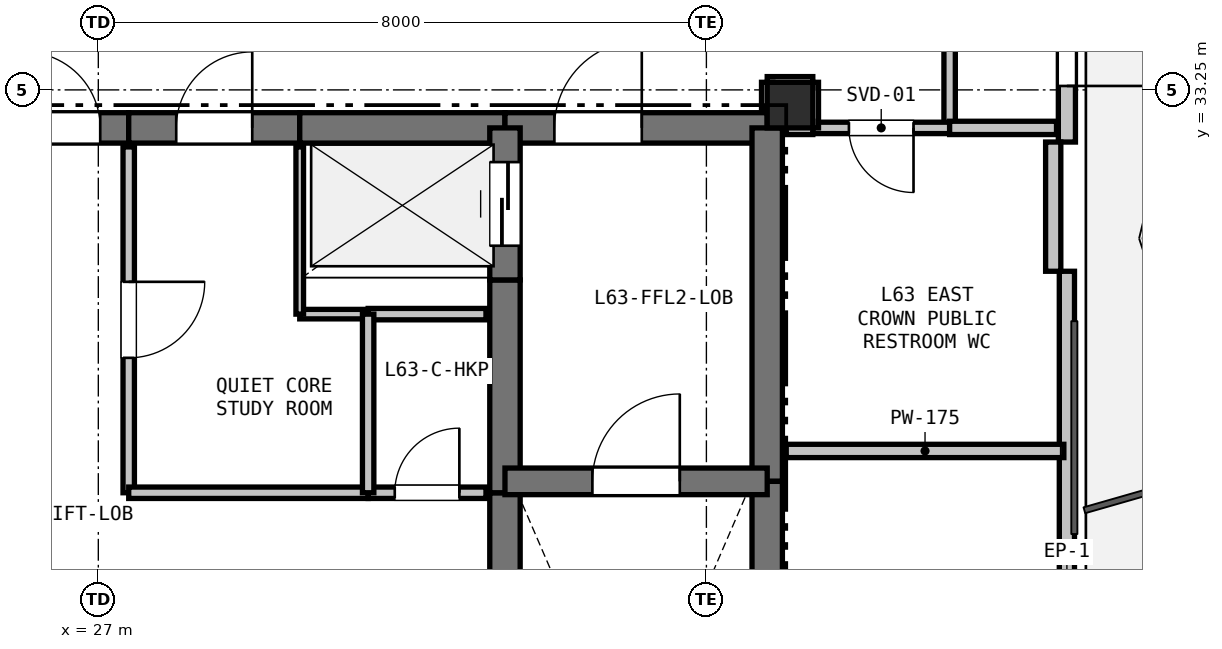
"""IFC4 building model, lengths in metres.
Left out: names, types, materials, properties, quantities, classifications, styles, units other than length and angle.
Written with IfcOpenShell. Run it as: python <this file> out.ifc"""

import sys

from ifc_helpers import new_model, si_unit, direction, frame, frame_2d, origin, origin_2d, place, context, subcontext, project, spatial, rectangle, extrude, element, fill, save


model = new_model("IFC4")
c1 = context("Model", 3, precision=1e-05, world=origin(), true_north=direction((0.0, 1.0)))
c2 = subcontext(c1, "Body", "Model", "MODEL_VIEW")
j1 = project(units=[si_unit("LENGTHUNIT", "METRE"), si_unit("PLANEANGLEUNIT", "RADIAN")], contexts=[c1])
p1 = place(None, origin())
s1 = spatial("IfcSite", under=j1, at=p1, CompositionType="ELEMENT")
p2 = place(p1, origin())
s2 = spatial("IfcBuilding", under=s1, at=p2, CompositionType="ELEMENT")
p3 = place(p2, frame((0.0, 0.0, 226.5)))
s3 = spatial("IfcBuildingStorey", under=s2, at=p3, CompositionType="ELEMENT", Elevation=226.5)
p4 = place(p3, frame((36.1, 33.05, 0.0), z_axis=(0.0, 0.0, 1.0), x_axis=(1.0, 0.0, 0.0)))
e1 = element("IfcColumn", 1, at=p4, inside=s3, PredefinedType="COLUMN", context=c2, shape_type="SweptSolid", body=[
    extrude(rectangle(XDim=0.6, YDim=0.6, at=origin_2d()), origin(), (0.0, 0.0, 1.0), 3.3),
])
p5 = place(p3, frame((39.743, 41.492, 0.0), z_axis=(0.0, 0.0, 1.0), x_axis=(0.0, -1.0, 0.0)))
e2 = element("IfcWall", 2, at=p5, inside=s3, PredefinedType="SOLIDWALL", context=c2, shape_type="SweptSolid", body=[
    extrude(rectangle(XDim=8.928, YDim=0.225, at=frame_2d((4.464, 0.0))), origin(), (0.0, 0.0, 1.0), 2.7),
])
p6 = place(p5, frame((7.09, 0.0, 0.0)))
e3 = element("IfcOpeningElement", 3, at=p6, cuts=e2, PredefinedType="OPENING", context=c2, shape_type="SweptSolid", body=[
    extrude(rectangle(XDim=1.1, YDim=2.1, at=frame_2d((0.55, 1.05))), frame((0.0, 0.123, 0.0), z_axis=(0.0, -1.0, 0.0), x_axis=(1.0, 0.0, 0.0)), (0.0, 0.0, 1.0), 0.245),
])
p7 = place(p5, frame((1.406, 0.0, 0.9)))
e4 = element("IfcOpeningElement", 4, at=p7, cuts=e2, PredefinedType="OPENING", context=c2, shape_type="SweptSolid", body=[
    extrude(rectangle(XDim=1.2, YDim=1.4, at=frame_2d((0.6, 0.7))), frame((0.0, 0.123, 0.0), z_axis=(0.0, -1.0, 0.0), x_axis=(1.0, 0.0, 0.0)), (0.0, 0.0, 1.0), 0.245),
])
p8 = place(p3, frame((39.743, 30.864, 0.0), z_axis=(0.0, 0.0, 1.0), x_axis=(0.0, -1.0, 0.0)))
e5 = element("IfcWall", 5, at=p8, inside=s3, PredefinedType="PARAPET", context=c2, shape_type="SweptSolid", body=[
    extrude(rectangle(XDim=8.228, YDim=0.2, at=frame_2d((4.114, 0.0))), origin(), (0.0, 0.0, 1.0), 0.2),
])
p9 = place(p3, frame((39.563, 32.564, 0.0), z_axis=(0.0, 0.0, 1.0), x_axis=(0.0, -1.0, 0.0)))
e6 = element("IfcWall", 6, at=p9, inside=s3, PredefinedType="PARAPET", context=c2, shape_type="SweptSolid", body=[
    extrude(rectangle(XDim=1.7, YDim=0.2, at=frame_2d((0.85, 0.0))), origin(), (0.0, 0.0, 1.0), 2.7),
])
p10 = place(p3, frame((25.65, 32.75, 0.0), z_axis=(0.0, 0.0, 1.0), x_axis=(1.0, 0.0, 0.0)))
e7 = element("IfcWall", 7, at=p10, inside=s3, PredefinedType="SHEAR", context=c2, shape_type="SweptSolid", body=[
    extrude(rectangle(XDim=1.75, YDim=0.4, at=frame_2d((0.875, 0.0))), origin(), (0.0, 0.0, 1.0), 3.08),
])
p11 = place(p10, frame((0.375, 0.0, 0.0)))
e8 = element("IfcOpeningElement", 8, at=p11, cuts=e7, PredefinedType="OPENING", context=c2, shape_type="SweptSolid", body=[
    extrude(rectangle(XDim=1.0, YDim=2.15, at=frame_2d((0.5, 1.075))), frame((0.0, 0.21, 0.0), z_axis=(0.0, -1.0, 0.0), x_axis=(1.0, 0.0, 0.0)), (0.0, 0.0, 1.0), 0.42),
])
p12 = place(p3, frame((27.4, 32.75, 0.0), z_axis=(0.0, 0.0, 1.0), x_axis=(1.0, 0.0, 0.0)))
e9 = element("IfcWall", 9, at=p12, inside=s3, PredefinedType="SHEAR", context=c2, shape_type="SweptSolid", body=[
    extrude(rectangle(XDim=2.25, YDim=0.4, at=frame_2d((1.125, 0.0))), origin(), (0.0, 0.0, 1.0), 3.08),
])
p13 = place(p12, frame((0.625, 0.0, 0.0)))
e10 = element("IfcOpeningElement", 10, at=p13, cuts=e9, PredefinedType="OPENING", context=c2, shape_type="SweptSolid", body=[
    extrude(rectangle(XDim=1.0, YDim=2.15, at=frame_2d((0.5, 1.075))), frame((0.0, 0.21, 0.0), z_axis=(0.0, -1.0, 0.0), x_axis=(1.0, 0.0, 0.0)), (0.0, 0.0, 1.0), 0.42),
])
p14 = place(p3, frame((29.65, 32.75, 0.0), z_axis=(0.0, 0.0, 1.0), x_axis=(1.0, 0.0, 0.0)))
e11 = element("IfcWall", 11, at=p14, inside=s3, PredefinedType="SHEAR", context=c2, shape_type="SweptSolid", body=[
    extrude(rectangle(XDim=2.7, YDim=0.4, at=frame_2d((1.35, 0.0))), origin(), (0.0, 0.0, 1.0), 3.08),
])
p15 = place(p3, frame((32.35, 32.75, 0.0), z_axis=(0.0, 0.0, 1.0), x_axis=(1.0, 0.0, 0.0)))
e12 = element("IfcWall", 12, at=p15, inside=s3, PredefinedType="SHEAR", context=c2, shape_type="SweptSolid", body=[
    extrude(rectangle(XDim=3.45, YDim=0.4, at=frame_2d((1.725, 0.0))), origin(), (0.0, 0.0, 1.0), 3.08),
])
p16 = place(p15, frame((0.65, 0.0, 0.0)))
e13 = element("IfcOpeningElement", 13, at=p16, cuts=e12, PredefinedType="OPENING", context=c2, shape_type="SweptSolid", body=[
    extrude(rectangle(XDim=1.15, YDim=2.15, at=frame_2d((0.575, 1.075))), frame((0.0, 0.21, 0.0), z_axis=(0.0, -1.0, 0.0), x_axis=(1.0, 0.0, 0.0)), (0.0, 0.0, 1.0), 0.42),
])
p17 = place(p3, frame((35.8, 32.75, 0.0), z_axis=(0.0, 0.0, 1.0), x_axis=(0.0, -1.0, 0.0)))
e14 = element("IfcWall", 14, at=p17, inside=s3, PredefinedType="SHEAR", context=c2, shape_type="SweptSolid", body=[
    extrude(rectangle(XDim=4.65, YDim=0.4, at=frame_2d((2.325, 0.0))), origin(), (0.0, 0.0, 1.0), 3.08),
])
p18 = place(p3, frame((35.8, 28.1, 0.0), z_axis=(0.0, 0.0, 1.0), x_axis=(0.0, -1.0, 0.0)))
e15 = element("IfcWall", 15, at=p18, inside=s3, PredefinedType="SHEAR", context=c2, shape_type="SweptSolid", body=[
    extrude(rectangle(XDim=7.35, YDim=0.4, at=frame_2d((3.675, 0.0))), origin(), (0.0, 0.0, 1.0), 3.08),
])
p19 = place(p3, frame((32.35, 25.55, 0.0), z_axis=(0.0, 0.0, 1.0), x_axis=(0.0, 1.0, 0.0)))
e16 = element("IfcWall", 16, at=p19, inside=s3, PredefinedType="SHEAR", context=c2, shape_type="SweptSolid", body=[
    extrude(rectangle(XDim=2.4, YDim=0.4, at=frame_2d((1.2, 0.0))), origin(), (0.0, 0.0, 1.0), 3.08),
])
p20 = place(p3, frame((32.35, 27.95, 0.0), z_axis=(0.0, 0.0, 1.0), x_axis=(0.0, 1.0, 0.0)))
e17 = element("IfcWall", 17, at=p20, inside=s3, PredefinedType="SHEAR", context=c2, shape_type="SweptSolid", body=[
    extrude(rectangle(XDim=2.8, YDim=0.4, at=frame_2d((1.4, 0.0))), origin(), (0.0, 0.0, 1.0), 3.08),
])
p21 = place(p3, frame((32.35, 30.75, 0.0), z_axis=(0.0, 0.0, 1.0), x_axis=(0.0, 1.0, 0.0)))
e18 = element("IfcWall", 18, at=p21, inside=s3, PredefinedType="SHEAR", context=c2, shape_type="SweptSolid", body=[
    extrude(rectangle(XDim=2.0, YDim=0.4, at=frame_2d((1.0, 0.0))), origin(), (0.0, 0.0, 1.0), 3.08),
])
p22 = place(p21, frame((0.45, 0.0, 0.0)))
e19 = element("IfcOpeningElement", 19, at=p22, cuts=e18, PredefinedType="OPENING", context=c2, shape_type="SweptSolid", body=[
    extrude(rectangle(XDim=1.1, YDim=2.15, at=frame_2d((0.55, 1.075))), frame((0.0, 0.21, 0.0), z_axis=(0.0, -1.0, 0.0), x_axis=(1.0, 0.0, 0.0)), (0.0, 0.0, 1.0), 0.42),
])
p23 = place(p3, frame((32.35, 28.1, 0.0), z_axis=(0.0, 0.0, 1.0), x_axis=(1.0, 0.0, 0.0)))
e20 = element("IfcWall", 20, at=p23, inside=s3, PredefinedType="SHEAR", context=c2, shape_type="SweptSolid", body=[
    extrude(rectangle(XDim=3.45, YDim=0.35, at=frame_2d((1.725, 0.0))), origin(), (0.0, 0.0, 1.0), 3.08),
])
p24 = place(p23, frame((1.15, 0.0, 0.0)))
e21 = element("IfcOpeningElement", 21, at=p24, cuts=e20, PredefinedType="OPENING", context=c2, shape_type="SweptSolid", body=[
    extrude(rectangle(XDim=1.15, YDim=2.15, at=frame_2d((0.575, 1.075))), frame((0.0, 0.185, 0.0), z_axis=(0.0, -1.0, 0.0), x_axis=(1.0, 0.0, 0.0)), (0.0, 0.0, 1.0), 0.37),
])
p25 = place(p3, frame((32.1, 30.3, 0.0), z_axis=(0.0, 0.0, 1.0), x_axis=(-1.0, 0.0, 0.0)))
e22 = element("IfcWall", 22, at=p25, inside=s3, PredefinedType="PARTITIONING", context=c2, shape_type="SweptSolid", body=[
    extrude(rectangle(XDim=1.55, YDim=0.15, at=frame_2d((0.775, 0.0))), origin(), (0.0, 0.0, 1.0), 3.08),
])
p26 = place(p3, frame((30.55, 30.3, 0.0), z_axis=(0.0, 0.0, 1.0), x_axis=(-1.0, 0.0, 0.0)))
e23 = element("IfcWall", 23, at=p26, inside=s3, PredefinedType="PARTITIONING", context=c2, shape_type="SweptSolid", body=[
    extrude(rectangle(XDim=0.9, YDim=0.125, at=frame_2d((0.45, 0.0))), origin(), (0.0, 0.0, 1.0), 3.08),
])
p27 = place(p3, frame((29.65, 30.3, 0.0), z_axis=(0.0, 0.0, 1.0), x_axis=(0.0, 1.0, 0.0)))
e24 = element("IfcWall", 24, at=p27, inside=s3, PredefinedType="PARTITIONING", context=c2, shape_type="SweptSolid", body=[
    extrude(rectangle(XDim=2.2, YDim=0.1, at=frame_2d((1.1, 0.0))), origin(), (0.0, 0.0, 1.0), 3.08),
])
p28 = place(p3, frame((27.4, 32.5, 0.0), z_axis=(0.0, 0.0, 1.0), x_axis=(0.0, -1.0, 0.0)))
e25 = element("IfcWall", 25, at=p28, inside=s3, PredefinedType="PARTITIONING", context=c2, shape_type="SweptSolid", body=[
    extrude(rectangle(XDim=4.55, YDim=0.15, at=frame_2d((2.275, 0.0))), origin(), (0.0, 0.0, 1.0), 3.08),
])
p29 = place(p28, frame((1.775, 0.0, 0.0)))
e26 = element("IfcOpeningElement", 26, at=p29, cuts=e25, PredefinedType="OPENING", context=c2, shape_type="SweptSolid", body=[
    extrude(rectangle(XDim=1.0, YDim=2.15, at=frame_2d((0.5, 1.075))), frame((0.0, 0.085, 0.0), z_axis=(0.0, -1.0, 0.0), x_axis=(1.0, 0.0, 0.0)), (0.0, 0.0, 1.0), 0.17),
])
p30 = place(p3, frame((27.4, 27.95, 0.0), z_axis=(0.0, 0.0, 1.0), x_axis=(1.0, 0.0, 0.0)))
e27 = element("IfcWall", 27, at=p30, inside=s3, PredefinedType="PARTITIONING", context=c2, shape_type="SweptSolid", body=[
    extrude(rectangle(XDim=3.15, YDim=0.15, at=frame_2d((1.575, 0.0))), origin(), (0.0, 0.0, 1.0), 3.08),
])
p31 = place(p3, frame((30.55, 27.95, 0.0), z_axis=(0.0, 0.0, 1.0), x_axis=(1.0, 0.0, 0.0)))
e28 = element("IfcWall", 28, at=p31, inside=s3, PredefinedType="PARTITIONING", context=c2, shape_type="SweptSolid", body=[
    extrude(rectangle(XDim=1.55, YDim=0.15, at=frame_2d((0.775, 0.0))), origin(), (0.0, 0.0, 1.0), 3.08),
])
p32 = place(p31, frame((0.35, 0.0, 0.0)))
e29 = element("IfcOpeningElement", 29, at=p32, cuts=e28, PredefinedType="OPENING", context=c2, shape_type="SweptSolid", body=[
    extrude(rectangle(XDim=0.85, YDim=2.1, at=frame_2d((0.425, 1.05))), frame((0.0, 0.085, 0.0), z_axis=(0.0, -1.0, 0.0), x_axis=(1.0, 0.0, 0.0)), (0.0, 0.0, 1.0), 0.17),
])
p33 = place(p3, frame((38.2, 35.2, 0.0), z_axis=(0.0, 0.0, 1.0), x_axis=(0.0, -1.0, 0.0)))
e30 = element("IfcWall", 30, at=p33, inside=s3, PredefinedType="PARTITIONING", context=c2, shape_type="SweptSolid", body=[
    extrude(rectangle(XDim=2.45, YDim=0.15, at=frame_2d((1.225, 0.0))), origin(), (0.0, 0.0, 1.0), 3.08),
])
p34 = place(p3, frame((38.2, 32.75, 0.0), z_axis=(0.0, 0.0, 1.0), x_axis=(-1.0, 0.0, 0.0)))
e31 = element("IfcWall", 31, at=p34, inside=s3, PredefinedType="PARTITIONING", context=c2, shape_type="SweptSolid", body=[
    extrude(rectangle(XDim=1.8, YDim=0.15, at=frame_2d((0.9, 0.0))), origin(), (0.0, 0.0, 1.0), 3.08),
])
p35 = place(p34, frame((0.475, 0.0, 0.0)))
e32 = element("IfcOpeningElement", 32, at=p35, cuts=e31, PredefinedType="OPENING", context=c2, shape_type="SweptSolid", body=[
    extrude(rectangle(XDim=0.85, YDim=2.1, at=frame_2d((0.425, 1.05))), frame((0.0, 0.085, 0.0), z_axis=(0.0, -1.0, 0.0), x_axis=(1.0, 0.0, 0.0)), (0.0, 0.0, 1.0), 0.17),
])
p36 = place(p3, frame((36.4, 32.75, 0.0), z_axis=(0.0, 0.0, 1.0), x_axis=(0.0, 1.0, 0.0)))
e33 = element("IfcWall", 33, at=p36, inside=s3, PredefinedType="PARTITIONING", context=c2, shape_type="SweptSolid", body=[
    extrude(rectangle(XDim=0.6, YDim=0.15, at=frame_2d((0.3, 0.0))), origin(), (0.0, 0.0, 1.0), 2.528),
])
p37 = place(p3, frame((36.4, 33.35, 0.0), z_axis=(0.0, 0.0, 1.0), x_axis=(-1.0, 0.0, 0.0)))
e34 = element("IfcWall", 34, at=p37, inside=s3, PredefinedType="PARTITIONING", context=c2, shape_type="SweptSolid", body=[
    extrude(rectangle(XDim=0.6, YDim=0.15, at=frame_2d((0.3, 0.0))), origin(), (0.0, 0.0, 1.0), 2.528),
])
p38 = place(p3, frame((35.8, 33.35, 0.0), z_axis=(0.0, 0.0, 1.0), x_axis=(0.0, -1.0, 0.0)))
e35 = element("IfcWall", 35, at=p38, inside=s3, PredefinedType="PARTITIONING", context=c2, shape_type="SweptSolid", body=[
    extrude(rectangle(XDim=0.35, YDim=0.15, at=frame_2d((0.175, 0.0))), origin(), (0.0, 0.0, 1.0), 2.605),
])
p39 = place(p3, frame((36.05, 32.75, 0.0), z_axis=(0.0, 0.0, 1.0), x_axis=(1.0, 0.0, 0.0)))
e36 = element("IfcWall", 36, at=p39, inside=s3, PredefinedType="PLUMBINGWALL", context=c2, shape_type="SweptSolid", body=[
    extrude(rectangle(XDim=0.35, YDim=0.175, at=frame_2d((0.175, 0.0))), origin(), (0.0, 0.0, 1.0), 2.605),
])
p40 = place(p3, frame((38.2, 32.75, 0.0), z_axis=(0.0, 0.0, 1.0), x_axis=(1.0, 0.0, 0.0)))
e37 = element("IfcWall", 37, at=p40, inside=s3, PredefinedType="PLUMBINGWALL", context=c2, shape_type="SweptSolid", body=[
    extrude(rectangle(XDim=1.406, YDim=0.175, at=frame_2d((0.703, 0.0))), origin(), (0.0, 0.0, 1.0), 2.365),
])
p41 = place(p3, frame((39.703, 28.5, 0.0), z_axis=(0.0, 0.0, 1.0), x_axis=(-1.0, 0.0, 0.0)))
e38 = element("IfcWall", 38, at=p41, inside=s3, PredefinedType="PLUMBINGWALL", context=c2, shape_type="SweptSolid", body=[
    extrude(rectangle(XDim=3.653, YDim=0.175, at=frame_2d((1.826, 0.0))), origin(), (0.0, 0.0, 1.0), 2.365),
])
p42 = place(p3, frame((30.55, 30.3, 0.0), z_axis=(0.0, 0.0, 1.0), x_axis=(0.0, -1.0, 0.0)))
e39 = element("IfcWall", 39, at=p42, inside=s3, PredefinedType="PARTITIONING", context=c2, shape_type="SweptSolid", body=[
    extrude(rectangle(XDim=2.35, YDim=0.15, at=frame_2d((1.175, 0.0))), origin(), (0.0, 0.0, 1.0), 3.08),
])
p43 = place(p6, origin())
e40 = element("IfcDoor", 40, at=p43, inside=s3, OperationType="SINGLE_SWING_RIGHT", PredefinedType="DOOR", context=c2, shape_type="SweptSolid", body=[
    extrude(rectangle(XDim=1.1, YDim=2.1, at=frame_2d((0.55, 1.05))), frame((0.0, 0.025, 0.0), z_axis=(0.0, -1.0, 0.0), x_axis=(1.0, 0.0, 0.0)), (0.0, 0.0, 1.0), 0.05),
])
fill(e3, e40)
p44 = place(p11, origin())
e41 = element("IfcDoor", 41, at=p44, inside=s3, OperationType="SINGLE_SWING_LEFT", PredefinedType="DOOR", context=c2, shape_type="SweptSolid", body=[
    extrude(rectangle(XDim=1.0, YDim=2.15, at=frame_2d((0.5, 1.075))), frame((0.0, 0.025, 0.0), z_axis=(0.0, -1.0, 0.0), x_axis=(1.0, 0.0, 0.0)), (0.0, 0.0, 1.0), 0.05),
])
fill(e8, e41)
p45 = place(p22, origin())
e42 = element("IfcDoor", 42, at=p45, inside=s3, OperationType="SLIDING_TO_LEFT", PredefinedType="DOOR", context=c2, shape_type="SweptSolid", body=[
    extrude(rectangle(XDim=1.1, YDim=2.15, at=frame_2d((0.55, 1.075))), frame((0.0, 0.025, 0.0), z_axis=(0.0, -1.0, 0.0), x_axis=(1.0, 0.0, 0.0)), (0.0, 0.0, 1.0), 0.05),
])
fill(e19, e42)
p46 = place(p24, origin())
e43 = element("IfcDoor", 43, at=p46, inside=s3, OperationType="SINGLE_SWING_RIGHT", PredefinedType="DOOR", context=c2, shape_type="SweptSolid", body=[
    extrude(rectangle(XDim=1.15, YDim=2.15, at=frame_2d((0.575, 1.075))), frame((0.0, 0.025, 0.0), z_axis=(0.0, -1.0, 0.0), x_axis=(1.0, 0.0, 0.0)), (0.0, 0.0, 1.0), 0.05),
])
fill(e21, e43)
p47 = place(p16, origin())
e44 = element("IfcDoor", 44, at=p47, inside=s3, OperationType="SINGLE_SWING_RIGHT", PredefinedType="DOOR", context=c2, shape_type="SweptSolid", body=[
    extrude(rectangle(XDim=1.15, YDim=2.15, at=frame_2d((0.575, 1.075))), frame((0.0, 0.025, 0.0), z_axis=(0.0, -1.0, 0.0), x_axis=(1.0, 0.0, 0.0)), (0.0, 0.0, 1.0), 0.05),
])
fill(e13, e44)
p48 = place(p29, origin())
e45 = element("IfcDoor", 45, at=p48, inside=s3, OperationType="SINGLE_SWING_LEFT", PredefinedType="DOOR", context=c2, shape_type="SweptSolid", body=[
    extrude(rectangle(XDim=1.0, YDim=2.15, at=frame_2d((0.5, 1.075))), frame((0.0, 0.025, 0.0), z_axis=(0.0, -1.0, 0.0), x_axis=(1.0, 0.0, 0.0)), (0.0, 0.0, 1.0), 0.05),
])
fill(e26, e45)
p49 = place(p32, origin())
e46 = element("IfcDoor", 46, at=p49, inside=s3, OperationType="SINGLE_SWING_RIGHT", PredefinedType="DOOR", context=c2, shape_type="SweptSolid", body=[
    extrude(rectangle(XDim=0.85, YDim=2.1, at=frame_2d((0.425, 1.05))), frame((0.0, 0.025, 0.0), z_axis=(0.0, -1.0, 0.0), x_axis=(1.0, 0.0, 0.0)), (0.0, 0.0, 1.0), 0.05),
])
fill(e29, e46)
p50 = place(p35, origin())
e47 = element("IfcDoor", 47, at=p50, inside=s3, OperationType="SINGLE_SWING_LEFT", PredefinedType="DOOR", context=c2, shape_type="SweptSolid", body=[
    extrude(rectangle(XDim=0.85, YDim=2.1, at=frame_2d((0.425, 1.05))), frame((0.0, 0.025, 0.0), z_axis=(0.0, -1.0, 0.0), x_axis=(1.0, 0.0, 0.0)), (0.0, 0.0, 1.0), 0.05),
])
fill(e32, e47)
p51 = place(p13, origin())
e48 = element("IfcDoor", 48, at=p51, inside=s3, OperationType="SINGLE_SWING_RIGHT", PredefinedType="DOOR", context=c2, shape_type="SweptSolid", body=[
    extrude(rectangle(XDim=1.0, YDim=2.15, at=frame_2d((0.5, 1.075))), frame((0.0, 0.025, 0.0), z_axis=(0.0, -1.0, 0.0), x_axis=(1.0, 0.0, 0.0)), (0.0, 0.0, 1.0), 0.05),
])
fill(e10, e48)
save(model, sys.argv[1])
